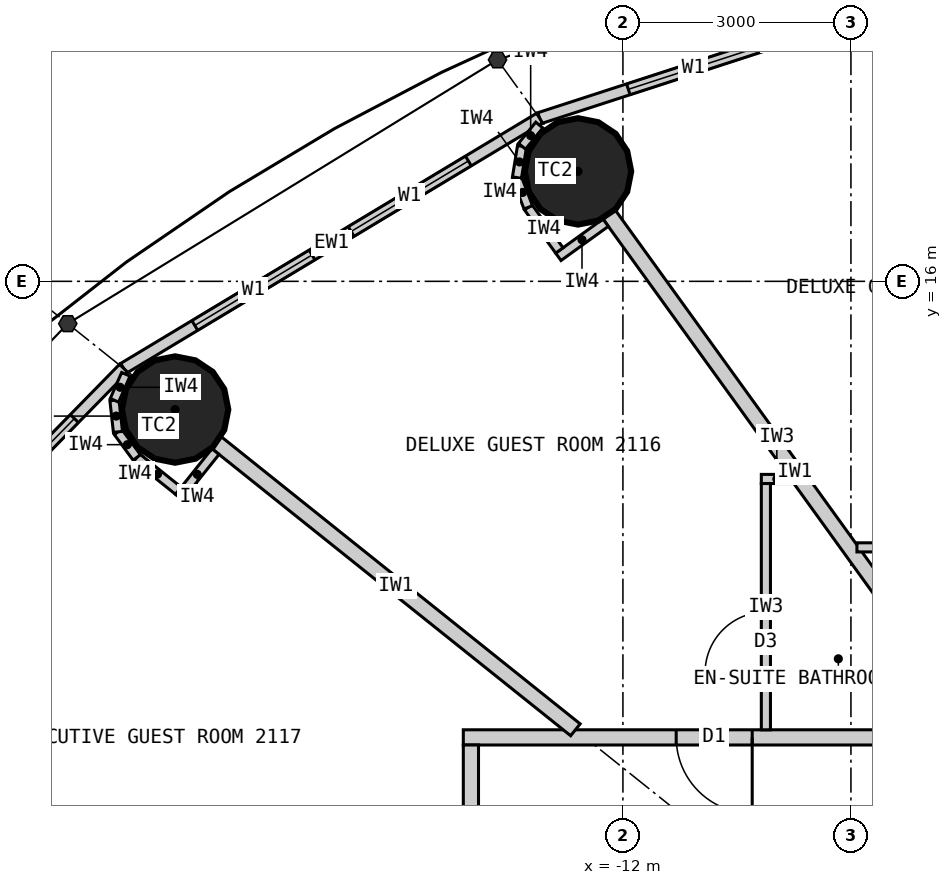
"""IFC4 building model, lengths in metres.
Left out: names, types, materials, properties, quantities, classifications, styles, units other than length and angle.
Written with IfcOpenShell. Run it as: python <this file> out.ifc"""

import sys

from ifc_helpers import new_model, si_unit, direction, frame, frame_2d, origin, origin_2d, place, context, subcontext, project, spatial, rectangle, circle, extrude, element, fill, save


model = new_model("IFC4")
c1 = context("Model", 3, precision=1e-05, world=origin(), true_north=direction((0.0, 1.0)))
c2 = subcontext(c1, "Body", "Model", "MODEL_VIEW")
j1 = project(units=[si_unit("LENGTHUNIT", "METRE"), si_unit("PLANEANGLEUNIT", "RADIAN")], contexts=[c1])
p1 = place(None, origin())
s1 = spatial("IfcSite", under=j1, at=p1, CompositionType="ELEMENT")
p2 = place(p1, origin())
s2 = spatial("IfcBuilding", under=s1, at=p2, CompositionType="ELEMENT")
p3 = place(p2, frame((0.0, 0.0, 83.7)))
s3 = spatial("IfcBuildingStorey", under=s2, at=p3, CompositionType="ELEMENT", Elevation=83.7)
for number, where, z_axis, x_axis in (
    (1, (-12.591, 17.447, 0.0), (0.0, 0.0, 1.0), (1.0, 0.0, 0.0)),
    (2, (-17.892, 14.313, 0.0), (0.0, 0.0, 1.0), (1.0, 0.0, 0.0)),
):
    element("IfcColumn", number, at=place(p3, frame(where, z_axis=z_axis, x_axis=x_axis)), inside=s3, PredefinedType="COLUMN", context=c2, shape_type="SweptSolid", body=[
        extrude(circle(Radius=0.7, at=origin_2d()), origin(), (0.0, 0.0, 1.0), 3.3),
    ])
p4 = place(p3, frame((-6.766, 20.202, 0.0), z_axis=(0.0, 0.0, 1.0), x_axis=(-0.951137534625, -0.308767534285, 0.0)))
e3 = element("IfcWall", 3, at=p4, inside=s3, PredefinedType="ELEMENTEDWALL", context=c2, shape_type="SweptSolid", body=[
    extrude(rectangle(XDim=6.655, YDim=0.15, at=frame_2d((3.328, 0.0))), origin(), (0.0, 0.0, 1.0), 3.12),
])
p5 = place(p4, frame((1.228, 0.0, 0.9)))
e4 = element("IfcOpeningElement", 4, at=p5, cuts=e3, PredefinedType="OPENING", context=c2, shape_type="SweptSolid", body=[
    extrude(rectangle(XDim=1.8, YDim=1.9, at=frame_2d((0.9, 0.95))), frame((0.0, 0.085, 0.0), z_axis=(0.0, -1.0, 0.0), x_axis=(1.0, 0.0, 0.0)), (0.0, 0.0, 1.0), 0.17),
])
p6 = place(p4, frame((3.628, 0.0, 0.9)))
e5 = element("IfcOpeningElement", 5, at=p6, cuts=e3, PredefinedType="OPENING", context=c2, shape_type="SweptSolid", body=[
    extrude(rectangle(XDim=1.8, YDim=1.9, at=frame_2d((0.9, 0.95))), frame((0.0, 0.085, 0.0), z_axis=(0.0, -1.0, 0.0), x_axis=(1.0, 0.0, 0.0)), (0.0, 0.0, 1.0), 0.17),
])
p7 = place(p3, frame((-13.096, 18.147, 0.0), z_axis=(0.0, 0.0, 1.0), x_axis=(-0.856983180864, -0.515344377787, 0.0)))
e6 = element("IfcWall", 6, at=p7, inside=s3, PredefinedType="ELEMENTEDWALL", context=c2, shape_type="SweptSolid", body=[
    extrude(rectangle(XDim=6.386, YDim=0.15, at=frame_2d((3.193, 0.0))), origin(), (0.0, 0.0, 1.0), 3.12),
])
p8 = place(p7, frame((1.093, 0.0, 0.9)))
e7 = element("IfcOpeningElement", 7, at=p8, cuts=e6, PredefinedType="OPENING", context=c2, shape_type="SweptSolid", body=[
    extrude(rectangle(XDim=1.8, YDim=1.9, at=frame_2d((0.9, 0.95))), frame((0.0, 0.085, 0.0), z_axis=(0.0, -1.0, 0.0), x_axis=(1.0, 0.0, 0.0)), (0.0, 0.0, 1.0), 0.17),
])
p9 = place(p7, frame((3.493, 0.0, 0.9)))
e8 = element("IfcOpeningElement", 8, at=p9, cuts=e6, PredefinedType="OPENING", context=c2, shape_type="SweptSolid", body=[
    extrude(rectangle(XDim=1.8, YDim=1.9, at=frame_2d((0.9, 0.95))), frame((0.0, 0.085, 0.0), z_axis=(0.0, -1.0, 0.0), x_axis=(1.0, 0.0, 0.0)), (0.0, 0.0, 1.0), 0.17),
])
p10 = place(p3, frame((-18.57, 14.856, 0.0), z_axis=(0.0, 0.0, 1.0), x_axis=(-0.699602905915, -0.714531856557, 0.0)))
e9 = element("IfcWall", 9, at=p10, inside=s3, PredefinedType="ELEMENTEDWALL", context=c2, shape_type="SweptSolid", body=[
    extrude(rectangle(XDim=6.051, YDim=0.15, at=frame_2d((3.025, 0.0))), origin(), (0.0, 0.0, 1.0), 3.12),
])
p11 = place(p10, frame((0.926, 0.0, 0.9)))
e10 = element("IfcOpeningElement", 10, at=p11, cuts=e9, PredefinedType="OPENING", context=c2, shape_type="SweptSolid", body=[
    extrude(rectangle(XDim=1.8, YDim=1.9, at=frame_2d((0.9, 0.95))), frame((0.0, 0.085, 0.0), z_axis=(0.0, -1.0, 0.0), x_axis=(1.0, 0.0, 0.0)), (0.0, 0.0, 1.0), 0.17),
])
p12 = place(p10, frame((3.325, 0.0, 0.9)))
e11 = element("IfcOpeningElement", 11, at=p12, cuts=e9, PredefinedType="OPENING", context=c2, shape_type="SweptSolid", body=[
    extrude(rectangle(XDim=1.8, YDim=1.9, at=frame_2d((0.9, 0.95))), frame((0.0, 0.085, 0.0), z_axis=(0.0, -1.0, 0.0), x_axis=(1.0, 0.0, 0.0)), (0.0, 0.0, 1.0), 0.17),
])
p13 = place(p3, frame((-14.1, 10.0, 0.0), z_axis=(0.0, 0.0, 1.0), x_axis=(1.0, 0.0, 0.0)))
e12 = element("IfcWall", 12, at=p13, inside=s3, PredefinedType="PARTITIONING", context=c2, shape_type="SweptSolid", body=[
    extrude(rectangle(XDim=28.2, YDim=0.2, at=frame_2d((14.1, 0.0))), origin(), (0.0, 0.0, 1.0), 3.12),
])
p14 = place(p13, frame((23.865, 0.0, 0.0)))
e13 = element("IfcOpeningElement", 13, at=p14, cuts=e12, PredefinedType="OPENING", context=c2, shape_type="SweptSolid", body=[
    extrude(rectangle(XDim=1.0, YDim=2.2, at=frame_2d((0.5, 1.1))), frame((0.0, 0.11, 0.0), z_axis=(0.0, -1.0, 0.0), x_axis=(1.0, 0.0, 0.0)), (0.0, 0.0, 1.0), 0.22),
])
p15 = place(p13, frame((18.529, 0.0, 0.0)))
e14 = element("IfcOpeningElement", 14, at=p15, cuts=e12, PredefinedType="OPENING", context=c2, shape_type="SweptSolid", body=[
    extrude(rectangle(XDim=1.0, YDim=2.2, at=frame_2d((0.5, 1.1))), frame((0.0, 0.11, 0.0), z_axis=(0.0, -1.0, 0.0), x_axis=(1.0, 0.0, 0.0)), (0.0, 0.0, 1.0), 0.22),
])
p16 = place(p13, frame((14.623, 0.0, 0.0)))
e15 = element("IfcOpeningElement", 15, at=p16, cuts=e12, PredefinedType="OPENING", context=c2, shape_type="SweptSolid", body=[
    extrude(rectangle(XDim=1.0, YDim=2.2, at=frame_2d((0.5, 1.1))), frame((0.0, 0.11, 0.0), z_axis=(0.0, -1.0, 0.0), x_axis=(1.0, 0.0, 0.0)), (0.0, 0.0, 1.0), 0.22),
])
p17 = place(p13, frame((11.24, 0.0, 0.0)))
e16 = element("IfcOpeningElement", 16, at=p17, cuts=e12, PredefinedType="OPENING", context=c2, shape_type="SweptSolid", body=[
    extrude(rectangle(XDim=1.0, YDim=2.2, at=frame_2d((0.5, 1.1))), frame((0.0, 0.11, 0.0), z_axis=(0.0, -1.0, 0.0), x_axis=(1.0, 0.0, 0.0)), (0.0, 0.0, 1.0), 0.22),
])
p18 = place(p13, frame((8.671, 0.0, 0.0)))
e17 = element("IfcOpeningElement", 17, at=p18, cuts=e12, PredefinedType="OPENING", context=c2, shape_type="SweptSolid", body=[
    extrude(rectangle(XDim=1.0, YDim=2.2, at=frame_2d((0.5, 1.1))), frame((0.0, 0.11, 0.0), z_axis=(0.0, -1.0, 0.0), x_axis=(1.0, 0.0, 0.0)), (0.0, 0.0, 1.0), 0.22),
])
p19 = place(p13, frame((2.801, 0.0, 0.0)))
e18 = element("IfcOpeningElement", 18, at=p19, cuts=e12, PredefinedType="OPENING", context=c2, shape_type="SweptSolid", body=[
    extrude(rectangle(XDim=1.0, YDim=2.2, at=frame_2d((0.5, 1.1))), frame((0.0, 0.11, 0.0), z_axis=(0.0, -1.0, 0.0), x_axis=(1.0, 0.0, 0.0)), (0.0, 0.0, 1.0), 0.22),
])
p20 = place(p3, frame((-14.0, 9.9, 0.0), z_axis=(0.0, 0.0, 1.0), x_axis=(0.0, -1.0, 0.0)))
e19 = element("IfcWall", 19, at=p20, inside=s3, PredefinedType="PARTITIONING", context=c2, shape_type="SweptSolid", body=[
    extrude(rectangle(XDim=19.8, YDim=0.2, at=frame_2d((9.9, 0.0))), origin(), (0.0, 0.0, 1.0), 3.12),
])
p21 = place(p20, frame((7.097, 0.0, 0.0)))
e20 = element("IfcOpeningElement", 20, at=p21, cuts=e19, PredefinedType="OPENING", context=c2, shape_type="SweptSolid", body=[
    extrude(rectangle(XDim=1.0, YDim=2.2, at=frame_2d((0.5, 1.1))), frame((0.0, 0.11, 0.0), z_axis=(0.0, -1.0, 0.0), x_axis=(1.0, 0.0, 0.0)), (0.0, 0.0, 1.0), 0.22),
])
p22 = place(p20, frame((10.778, 0.0, 0.0)))
e21 = element("IfcOpeningElement", 21, at=p22, cuts=e19, PredefinedType="OPENING", context=c2, shape_type="SweptSolid", body=[
    extrude(rectangle(XDim=1.0, YDim=2.2, at=frame_2d((0.5, 1.1))), frame((0.0, 0.11, 0.0), z_axis=(0.0, -1.0, 0.0), x_axis=(1.0, 0.0, 0.0)), (0.0, 0.0, 1.0), 0.22),
])
p23 = place(p20, frame((13.552, 0.0, 0.0)))
e22 = element("IfcOpeningElement", 22, at=p23, cuts=e19, PredefinedType="OPENING", context=c2, shape_type="SweptSolid", body=[
    extrude(rectangle(XDim=1.0, YDim=2.2, at=frame_2d((0.5, 1.1))), frame((0.0, 0.11, 0.0), z_axis=(0.0, -1.0, 0.0), x_axis=(1.0, 0.0, 0.0)), (0.0, 0.0, 1.0), 0.22),
])
p24 = place(p20, frame((18.698, 0.0, 0.0)))
e23 = element("IfcOpeningElement", 23, at=p24, cuts=e19, PredefinedType="OPENING", context=c2, shape_type="SweptSolid", body=[
    extrude(rectangle(XDim=1.0, YDim=2.2, at=frame_2d((0.5, 1.1))), frame((0.0, 0.11, 0.0), z_axis=(0.0, -1.0, 0.0), x_axis=(1.0, 0.0, 0.0)), (0.0, 0.0, 1.0), 0.22),
])
p25 = place(p20, frame((1.877, 0.0, 0.0)))
e24 = element("IfcOpeningElement", 24, at=p25, cuts=e19, PredefinedType="OPENING", context=c2, shape_type="SweptSolid", body=[
    extrude(rectangle(XDim=1.0, YDim=2.2, at=frame_2d((0.5, 1.1))), frame((0.0, 0.11, 0.0), z_axis=(0.0, -1.0, 0.0), x_axis=(1.0, 0.0, 0.0)), (0.0, 0.0, 1.0), 0.22),
])
p26 = place(p3, frame((-7.289, 10.1, 0.0), z_axis=(0.0, 0.0, 1.0), x_axis=(-0.585198353053, 0.810890182197, 0.0)))
e25 = element("IfcWall", 25, at=p26, inside=s3, PredefinedType="PARTITIONING", context=c2, shape_type="SweptSolid", body=[
    extrude(rectangle(XDim=8.36, YDim=0.2, at=frame_2d((4.18, 0.0))), origin(), (0.0, 0.0, 1.0), 2.32),
])
p27 = place(p3, frame((-12.625, 10.1, 0.0), z_axis=(0.0, 0.0, 1.0), x_axis=(-0.780892451574, 0.624665493744, 0.0)))
e26 = element("IfcWall", 26, at=p27, inside=s3, PredefinedType="PARTITIONING", context=c2, shape_type="SweptSolid", body=[
    extrude(rectangle(XDim=6.045, YDim=0.2, at=frame_2d((3.022, 0.0))), origin(), (0.0, 0.0, 1.0), 2.32),
])
p28 = place(p3, frame((-8.921, 12.5, 0.0), z_axis=(0.0, 0.0, 1.0), x_axis=(1.0, 0.0, 0.0)))
e27 = element("IfcWall", 27, at=p28, inside=s3, PredefinedType="PARTITIONING", context=c2, shape_type="SweptSolid", body=[
    extrude(rectangle(XDim=3.372, YDim=0.12, at=frame_2d((1.686, 0.0))), origin(), (0.0, 0.0, 1.0), 3.12),
])
p29 = place(p3, frame((-9.771, 13.4, 0.0), z_axis=(0.0, 0.0, 1.0), x_axis=(-1.0, 0.0, 0.0)))
e28 = element("IfcWall", 28, at=p29, inside=s3, PredefinedType="PARTITIONING", context=c2, shape_type="SweptSolid", body=[
    extrude(rectangle(XDim=0.408, YDim=0.12, at=frame_2d((0.204, 0.0))), origin(), (0.0, 0.0, 1.0), 3.12),
])
p30 = place(p3, frame((-10.119, 10.1, 0.0), z_axis=(0.0, 0.0, 1.0), x_axis=(0.0, 1.0, 0.0)))
e29 = element("IfcWall", 29, at=p30, inside=s3, PredefinedType="PARTITIONING", context=c2, shape_type="SweptSolid", body=[
    extrude(rectangle(XDim=3.24, YDim=0.12, at=frame_2d((1.62, 0.0))), origin(), (0.0, 0.0, 1.0), 3.12),
])
p31 = place(p30, frame((0.75, 0.0, 0.0)))
e30 = element("IfcOpeningElement", 30, at=p31, cuts=e29, PredefinedType="OPENING", context=c2, shape_type="SweptSolid", body=[
    extrude(rectangle(XDim=0.8, YDim=2.1, at=frame_2d((0.4, 1.05))), frame((0.0, 0.07, 0.0), z_axis=(0.0, -1.0, 0.0), x_axis=(1.0, 0.0, 0.0)), (0.0, 0.0, 1.0), 0.14),
])
p32 = place(p3, frame((-12.227, 16.772, 0.0), z_axis=(0.0, 0.0, 1.0), x_axis=(-0.810821798253, -0.585293098778, 0.0)))
e31 = element("IfcWall", 31, at=p32, inside=s3, PredefinedType="PARTITIONING", context=c2, shape_type="SweptSolid", body=[
    extrude(rectangle(XDim=0.768, YDim=0.12, at=frame_2d((0.384, 0.0))), origin(), (0.0, 0.0, 1.0), 3.12),
])
p33 = place(p3, frame((-12.836, 16.406, 0.0), z_axis=(0.0, 0.0, 1.0), x_axis=(-0.585223113993, 0.810872312296, 0.0)))
e32 = element("IfcWall", 32, at=p33, inside=s3, PredefinedType="PARTITIONING", context=c2, shape_type="SweptSolid", body=[
    extrude(rectangle(XDim=0.7, YDim=0.12, at=frame_2d((0.35, 0.0))), origin(), (0.0, 0.0, 1.0), 3.12),
])
p34 = place(p3, frame((-13.246, 16.974, 0.0), z_axis=(0.0, 0.0, 1.0), x_axis=(-0.355728122235, 0.934589483705, 0.0)))
e33 = element("IfcWall", 33, at=p34, inside=s3, PredefinedType="PARTITIONING", context=c2, shape_type="SweptSolid", body=[
    extrude(rectangle(XDim=0.418, YDim=0.12, at=frame_2d((0.209, 0.0))), origin(), (0.0, 0.0, 1.0), 3.12),
])
p35 = place(p3, frame((-13.394, 17.365, 0.0), z_axis=(0.0, 0.0, 1.0), x_axis=(0.159379276926, 0.987217425943, 0.0)))
e34 = element("IfcWall", 34, at=p35, inside=s3, PredefinedType="PARTITIONING", context=c2, shape_type="SweptSolid", body=[
    extrude(rectangle(XDim=0.418, YDim=0.12, at=frame_2d((0.209, 0.0))), origin(), (0.0, 0.0, 1.0), 3.12),
])
p36 = place(p3, frame((-13.328, 17.777, 0.0), z_axis=(0.0, 0.0, 1.0), x_axis=(0.632276783541, 0.774742582407, 0.0)))
e35 = element("IfcWall", 35, at=p36, inside=s3, PredefinedType="PARTITIONING", context=c2, shape_type="SweptSolid", body=[
    extrude(rectangle(XDim=0.36, YDim=0.12, at=frame_2d((0.18, 0.0))), origin(), (0.0, 0.0, 1.0), 3.12),
])
p37 = place(p3, frame((-17.361, 13.76, 0.0), z_axis=(0.0, 0.0, 1.0), x_axis=(-0.624501042889, -0.781023973659, 0.0)))
e36 = element("IfcWall", 36, at=p37, inside=s3, PredefinedType="PARTITIONING", context=c2, shape_type="SweptSolid", body=[
    extrude(rectangle(XDim=0.767, YDim=0.12, at=frame_2d((0.384, 0.0))), origin(), (0.0, 0.0, 1.0), 3.12),
])
p38 = place(p3, frame((-17.85, 13.246, 0.0), z_axis=(0.0, 0.0, 1.0), x_axis=(-0.780902834923, 0.62465251333, 0.0)))
e37 = element("IfcWall", 37, at=p38, inside=s3, PredefinedType="PARTITIONING", context=c2, shape_type="SweptSolid", body=[
    extrude(rectangle(XDim=0.7, YDim=0.12, at=frame_2d((0.35, 0.0))), origin(), (0.0, 0.0, 1.0), 3.12),
])
for number, where, z_axis, x_axis in (
    (38, (-18.396, 13.683, 0.0), (0.0, 0.0, 1.0), (-0.592, 0.806, 0.0)),
    (39, (-18.644, 14.02, 0.0), (0.0, 0.0, 1.0), (-0.11, 0.994, 0.0)),
):
    element("IfcWall", number, at=place(p3, frame(where, z_axis=z_axis, x_axis=x_axis)), inside=s3, PredefinedType="PARTITIONING", context=c2, shape_type="SweptSolid", body=[
        extrude(rectangle(XDim=0.418, YDim=0.12, at=frame_2d((0.209, 0.0))), origin(), (0.0, 0.0, 1.0), 3.12),
    ])
p39 = place(p3, frame((-18.69, 14.435, 0.0), z_axis=(0.0, 0.0, 1.0), x_axis=(0.401093412634, 0.91603715773, 0.0)))
e40 = element("IfcWall", 40, at=p39, inside=s3, PredefinedType="PARTITIONING", context=c2, shape_type="SweptSolid", body=[
    extrude(rectangle(XDim=0.373, YDim=0.12, at=frame_2d((0.187, 0.0))), origin(), (0.0, 0.0, 1.0), 3.12),
])
p40 = place(p6, origin())
e41 = element("IfcWindow", 41, at=p40, inside=s3, PartitioningType="SINGLE_PANEL", PredefinedType="WINDOW", context=c2, shape_type="SweptSolid", body=[
    extrude(rectangle(XDim=1.8, YDim=1.9, at=frame_2d((0.9, 0.95))), frame((0.0, 0.03, 0.0), z_axis=(0.0, -1.0, 0.0), x_axis=(1.0, 0.0, 0.0)), (0.0, 0.0, 1.0), 0.06),
])
fill(e5, e41)
p41 = place(p8, origin())
e42 = element("IfcWindow", 42, at=p41, inside=s3, PartitioningType="SINGLE_PANEL", PredefinedType="WINDOW", context=c2, shape_type="SweptSolid", body=[
    extrude(rectangle(XDim=1.8, YDim=1.9, at=frame_2d((0.9, 0.95))), frame((0.0, 0.03, 0.0), z_axis=(0.0, -1.0, 0.0), x_axis=(1.0, 0.0, 0.0)), (0.0, 0.0, 1.0), 0.06),
])
fill(e7, e42)
p42 = place(p9, origin())
e43 = element("IfcWindow", 43, at=p42, inside=s3, PartitioningType="SINGLE_PANEL", PredefinedType="WINDOW", context=c2, shape_type="SweptSolid", body=[
    extrude(rectangle(XDim=1.8, YDim=1.9, at=frame_2d((0.9, 0.95))), frame((0.0, 0.03, 0.0), z_axis=(0.0, -1.0, 0.0), x_axis=(1.0, 0.0, 0.0)), (0.0, 0.0, 1.0), 0.06),
])
fill(e8, e43)
p43 = place(p11, origin())
e44 = element("IfcWindow", 44, at=p43, inside=s3, PartitioningType="SINGLE_PANEL", PredefinedType="WINDOW", context=c2, shape_type="SweptSolid", body=[
    extrude(rectangle(XDim=1.8, YDim=1.9, at=frame_2d((0.9, 0.95))), frame((0.0, 0.03, 0.0), z_axis=(0.0, -1.0, 0.0), x_axis=(1.0, 0.0, 0.0)), (0.0, 0.0, 1.0), 0.06),
])
fill(e10, e44)
p44 = place(p31, origin())
e45 = element("IfcDoor", 45, at=p44, inside=s3, OperationType="SINGLE_SWING_LEFT", PredefinedType="DOOR", context=c2, shape_type="SweptSolid", body=[
    extrude(rectangle(XDim=0.8, YDim=2.1, at=frame_2d((0.4, 1.05))), frame((0.0, 0.025, 0.0), z_axis=(0.0, -1.0, 0.0), x_axis=(1.0, 0.0, 0.0)), (0.0, 0.0, 1.0), 0.05),
])
fill(e30, e45)
p45 = place(p19, origin())
e46 = element("IfcDoor", 46, at=p45, inside=s3, OperationType="SINGLE_SWING_RIGHT", PredefinedType="DOOR", context=c2, shape_type="SweptSolid", body=[
    extrude(rectangle(XDim=1.0, YDim=2.2, at=frame_2d((0.5, 1.1))), frame((0.0, 0.025, 0.0), z_axis=(0.0, -1.0, 0.0), x_axis=(1.0, 0.0, 0.0)), (0.0, 0.0, 1.0), 0.05),
])
fill(e18, e46)
save(model, sys.argv[1])
